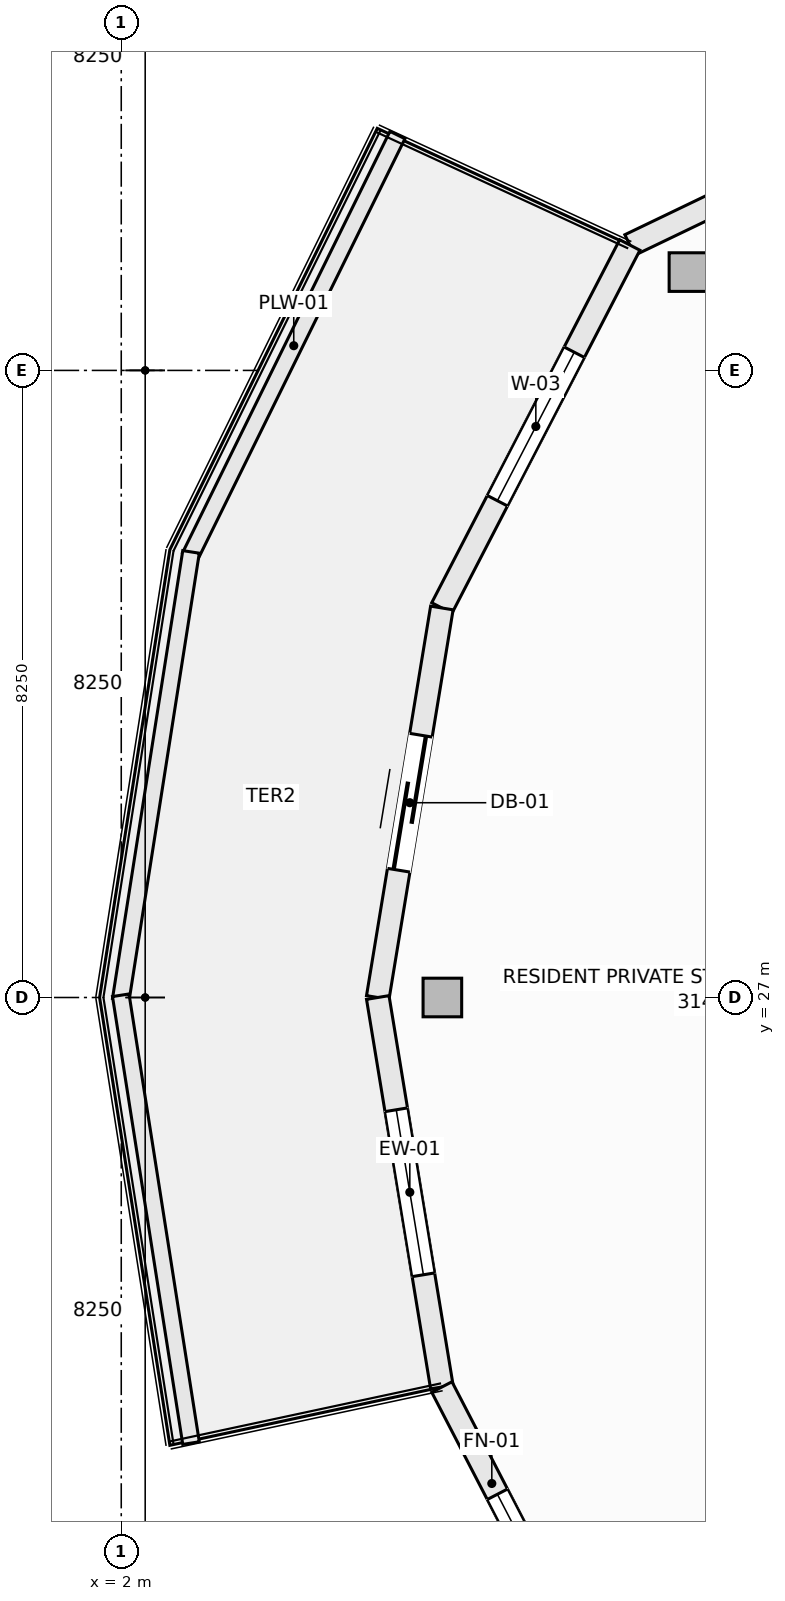
"""IFC4 building model, lengths in metres.
Left out: names, types, materials, properties, quantities, classifications, styles, units other than length and angle.
Written with IfcOpenShell. Run it as: python <this file> out.ifc"""

import sys

from ifc_helpers import new_model, si_unit, direction, frame, frame_2d, origin, origin_2d, place, context, subcontext, project, spatial, rectangle, hollow_rectangle, extrude, element, fill, save


model = new_model("IFC4")
c1 = context("Model", 3, precision=1e-05, world=origin(), true_north=direction((0.0, 1.0)))
c2 = subcontext(c1, "Body", "Model", "MODEL_VIEW")
j1 = project(units=[si_unit("LENGTHUNIT", "METRE"), si_unit("PLANEANGLEUNIT", "RADIAN")], contexts=[c1])
p1 = place(None, origin())
s1 = spatial("IfcSite", under=j1, at=p1, CompositionType="ELEMENT")
p2 = place(p1, origin())
s2 = spatial("IfcBuilding", under=s1, at=p2, CompositionType="ELEMENT")
p3 = place(p2, frame((0.0, 0.0, 203.0)))
s3 = spatial("IfcBuildingStorey", under=s2, at=p3, CompositionType="ELEMENT", Elevation=203.0)
for number, where, z_axis, x_axis in (
    (1, (9.463, 36.544, -0.27), (0.0, 0.0, 1.0), (1.0, 0.0, 0.0)),
    (2, (6.225, 27.0, -0.27), (0.0, 0.0, 1.0), (1.0, 0.0, 0.0)),
):
    element("IfcColumn", number, at=place(p3, frame(where, z_axis=z_axis, x_axis=x_axis)), inside=s3, PredefinedType="COLUMN", context=c2, shape_type="SweptSolid", body=[
        extrude(hollow_rectangle(XDim=0.508, YDim=0.508, WallThickness=0.019, at=origin_2d()), origin(), (0.0, 0.0, 1.0), 3.3),
    ])
p4 = place(p3, frame((8.691, 36.9, 0.0), z_axis=(0.0, 0.0, 1.0), x_axis=(0.901348331142, 0.433094892545, 0.0)))
e3 = element("IfcWall", 3, at=p4, inside=s3, PredefinedType="SOLIDWALL", context=c2, shape_type="SweptSolid", body=[
    extrude(rectangle(XDim=6.021, YDim=0.3, at=frame_2d((3.01, 0.0))), origin(), (0.0, 0.0, 1.0), 2.605),
])
p5 = place(p4, frame((1.91, 0.0, 0.72)))
e4 = element("IfcOpeningElement", 4, at=p5, cuts=e3, PredefinedType="OPENING", context=c2, shape_type="SweptSolid", body=[
    extrude(rectangle(XDim=2.2, YDim=1.65, at=frame_2d((1.1, 0.825))), frame((0.0, 0.16, 0.0), z_axis=(0.0, -1.0, 0.0), x_axis=(1.0, 0.0, 0.0)), (0.0, 0.0, 1.0), 0.32),
])
p6 = place(p3, frame((6.218, 32.125, 0.0), z_axis=(0.0, 0.0, 1.0), x_axis=(0.459808219482, 0.888018243786, 0.0)))
e5 = element("IfcWall", 5, at=p6, inside=s3, PredefinedType="SOLIDWALL", context=c2, shape_type="SweptSolid", body=[
    extrude(rectangle(XDim=5.378, YDim=0.3, at=frame_2d((2.689, 0.0))), origin(), (0.0, 0.0, 1.0), 2.605),
])
p7 = place(p6, frame((1.589, 0.0, 0.72)))
e6 = element("IfcOpeningElement", 6, at=p7, cuts=e5, PredefinedType="OPENING", context=c2, shape_type="SweptSolid", body=[
    extrude(rectangle(XDim=2.2, YDim=1.65, at=frame_2d((1.1, 0.825))), frame((0.0, 0.16, 0.0), z_axis=(0.0, -1.0, 0.0), x_axis=(1.0, 0.0, 0.0)), (0.0, 0.0, 1.0), 0.32),
])
p8 = place(p3, frame((5.375, 27.0, 0.0), z_axis=(0.0, 0.0, 1.0), x_axis=(0.16237087798, 0.986729799886, 0.0)))
e7 = element("IfcWall", 7, at=p8, inside=s3, PredefinedType="SOLIDWALL", context=c2, shape_type="SweptSolid", body=[
    extrude(rectangle(XDim=5.193, YDim=0.3, at=frame_2d((2.597, 0.0))), origin(), (0.0, 0.0, 1.0), 2.605),
])
p9 = place(p8, frame((1.697, 0.0, 0.0)))
e8 = element("IfcOpeningElement", 8, at=p9, cuts=e7, PredefinedType="OPENING", context=c2, shape_type="SweptSolid", body=[
    extrude(rectangle(XDim=1.8, YDim=2.25, at=frame_2d((0.9, 1.125))), frame((0.0, 0.16, 0.0), z_axis=(0.0, -1.0, 0.0), x_axis=(1.0, 0.0, 0.0)), (0.0, 0.0, 1.0), 0.32),
])
p10 = place(p3, frame((5.375, 27.0, 0.0), z_axis=(0.0, 0.0, 1.0), x_axis=(0.16237087798, -0.986729799886, 0.0)))
e9 = element("IfcWall", 9, at=p10, inside=s3, PredefinedType="SOLIDWALL", context=c2, shape_type="SweptSolid", body=[
    extrude(rectangle(XDim=5.193, YDim=0.3, at=frame_2d((2.597, 0.0))), origin(), (0.0, 0.0, 1.0), 2.605),
])
p11 = place(p10, frame((1.497, 0.0, 0.72)))
e10 = element("IfcOpeningElement", 10, at=p11, cuts=e9, PredefinedType="OPENING", context=c2, shape_type="SweptSolid", body=[
    extrude(rectangle(XDim=2.2, YDim=1.65, at=frame_2d((1.1, 0.825))), frame((0.0, 0.16, 0.0), z_axis=(0.0, -1.0, 0.0), x_axis=(1.0, 0.0, 0.0)), (0.0, 0.0, 1.0), 0.32),
])
p12 = place(p3, frame((6.218, 21.875, 0.0), z_axis=(0.0, 0.0, 1.0), x_axis=(0.459808219482, -0.888018243786, 0.0)))
e11 = element("IfcWall", 11, at=p12, inside=s3, PredefinedType="SOLIDWALL", context=c2, shape_type="SweptSolid", body=[
    extrude(rectangle(XDim=5.378, YDim=0.3, at=frame_2d((2.689, 0.0))), origin(), (0.0, 0.0, 1.0), 2.605),
])
p13 = place(p12, frame((1.589, 0.0, 0.72)))
e12 = element("IfcOpeningElement", 12, at=p13, cuts=e11, PredefinedType="OPENING", context=c2, shape_type="SweptSolid", body=[
    extrude(rectangle(XDim=2.2, YDim=1.65, at=frame_2d((1.1, 0.825))), frame((0.0, 0.16, 0.0), z_axis=(0.0, -1.0, 0.0), x_axis=(1.0, 0.0, 0.0)), (0.0, 0.0, 1.0), 0.32),
])
p14 = place(p3, frame((2.906, 32.804, 0.0), z_axis=(0.0, 0.0, 1.0), x_axis=(0.441640961804, 0.897191875162, 0.0)))
e13 = element("IfcWall", 13, at=p14, inside=s3, PredefinedType="PARAPET", context=c2, shape_type="SweptSolid", body=[
    extrude(rectangle(XDim=6.178, YDim=0.22, at=frame_2d((3.089, 0.0))), origin(), (0.0, 0.0, 1.0), 0.52),
])
for number, where, z_axis, x_axis in (
    (14, (1.993, 26.971, 0.0), (0.0, 0.0, 1.0), (0.155, 0.988, 0.0)),
    (15, (1.993, 27.029, 0.0), (0.0, 0.0, 1.0), (0.155, -0.988, 0.0)),
):
    element("IfcWall", number, at=place(p3, frame(where, z_axis=z_axis, x_axis=x_axis)), inside=s3, PredefinedType="PARAPET", context=c2, shape_type="SweptSolid", body=[
        extrude(rectangle(XDim=5.964, YDim=0.22, at=frame_2d((2.982, 0.0))), origin(), (0.0, 0.0, 1.0), 0.52),
    ])
p15 = place(p7, origin())
e16 = element("IfcWindow", 16, at=p15, inside=s3, PartitioningType="SINGLE_PANEL", PredefinedType="WINDOW", context=c2, shape_type="SweptSolid", body=[
    extrude(rectangle(XDim=2.2, YDim=1.65, at=frame_2d((1.1, 0.825))), frame((0.0, 0.03, 0.0), z_axis=(0.0, -1.0, 0.0), x_axis=(1.0, 0.0, 0.0)), (0.0, 0.0, 1.0), 0.06),
])
fill(e6, e16)
p16 = place(p9, origin())
e17 = element("IfcDoor", 17, at=p16, inside=s3, OperationType="SLIDING_TO_LEFT", PredefinedType="DOOR", context=c2, shape_type="SweptSolid", body=[
    extrude(rectangle(XDim=1.8, YDim=2.25, at=frame_2d((0.9, 1.125))), frame((0.0, 0.025, 0.0), z_axis=(0.0, -1.0, 0.0), x_axis=(1.0, 0.0, 0.0)), (0.0, 0.0, 1.0), 0.05),
])
fill(e8, e17)
p17 = place(p11, origin())
e18 = element("IfcWindow", 18, at=p17, inside=s3, PartitioningType="SINGLE_PANEL", PredefinedType="WINDOW", context=c2, shape_type="SweptSolid", body=[
    extrude(rectangle(XDim=2.2, YDim=1.65, at=frame_2d((1.1, 0.825))), frame((0.0, 0.03, 0.0), z_axis=(0.0, -1.0, 0.0), x_axis=(1.0, 0.0, 0.0)), (0.0, 0.0, 1.0), 0.06),
])
fill(e10, e18)
p18 = place(p13, origin())
e19 = element("IfcWindow", 19, at=p18, inside=s3, PartitioningType="SINGLE_PANEL", PredefinedType="WINDOW", context=c2, shape_type="SweptSolid", body=[
    extrude(rectangle(XDim=2.2, YDim=1.65, at=frame_2d((1.1, 0.825))), frame((0.0, 0.03, 0.0), z_axis=(0.0, -1.0, 0.0), x_axis=(1.0, 0.0, 0.0)), (0.0, 0.0, 1.0), 0.06),
])
fill(e12, e19)
save(model, sys.argv[1])
